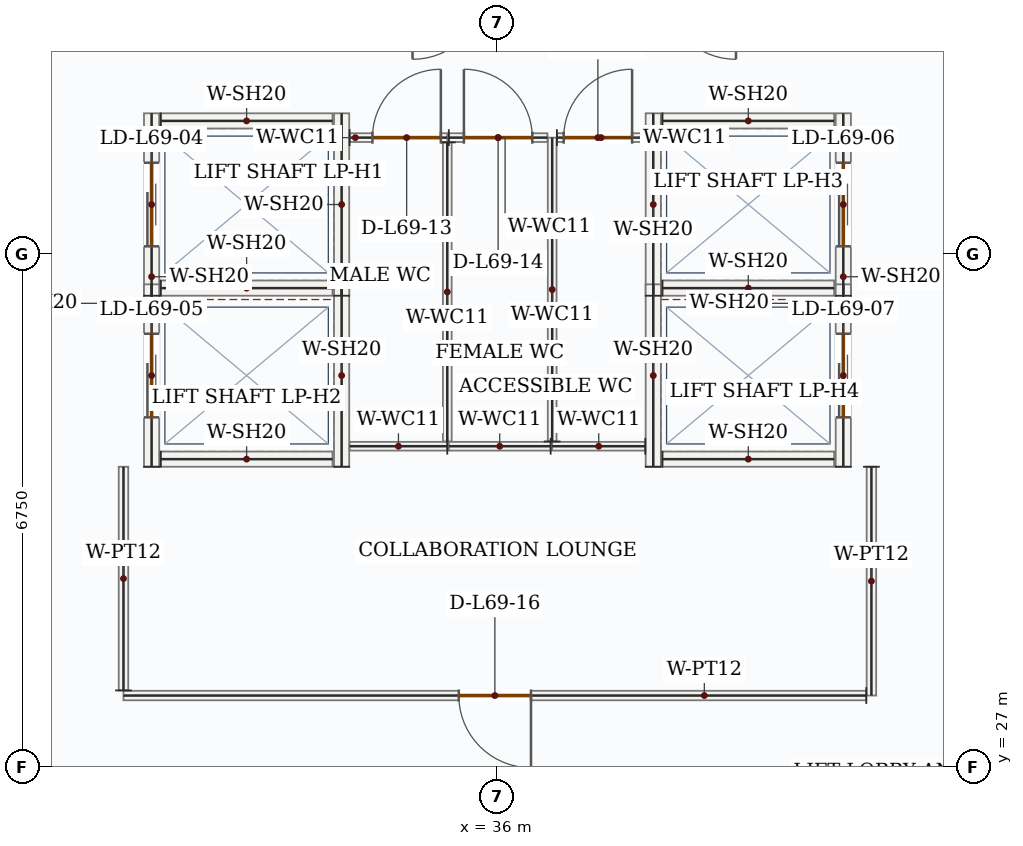
"""IFC4 building model, lengths in metres.
Left out: names, types, materials, properties, quantities, classifications, styles, units other than length and angle.
Written with IfcOpenShell. Run it as: python <this file> out.ifc"""

import sys

from ifc_helpers import new_model, si_unit, direction, frame, frame_2d, origin, place, context, subcontext, project, spatial, rectangle, extrude, source, transform, mapped, element, fill, save


model = new_model("IFC4")
c1 = context("Model", 3, precision=1e-05, world=origin(), true_north=direction((0.0, 1.0)))
c2 = subcontext(c1, "Body", "Model", "MODEL_VIEW")
j1 = project(units=[si_unit("LENGTHUNIT", "METRE"), si_unit("PLANEANGLEUNIT", "RADIAN")], contexts=[c1])
p1 = place(None, origin())
s1 = spatial("IfcSite", under=j1, at=p1, CompositionType="ELEMENT")
p2 = place(p1, origin())
s2 = spatial("IfcBuilding", under=s1, at=p2, CompositionType="ELEMENT")
p3 = place(p2, frame((0.0, 0.0, 287.85)))
s3 = spatial("IfcBuildingStorey", under=s2, at=p3, CompositionType="ELEMENT", Elevation=287.85)
p4 = place(p3, frame((31.45, 33.2, 0.0), z_axis=(0.0, 0.0, 1.0), x_axis=(0.0, 1.0, 0.0)))
e1 = element("IfcWall", 1, at=p4, inside=s3, PredefinedType="SOLIDWALL", context=c2, shape_type="SweptSolid", body=[
    extrude(rectangle(XDim=2.4, YDim=0.2, at=frame_2d((1.2, 0.0))), origin(), (0.0, 0.0, 1.0), 3.5),
])
p5 = place(p4, frame((0.65, 0.0, 0.0)))
e2 = element("IfcOpeningElement", 2, at=p5, cuts=e1, PredefinedType="OPENING", context=c2, shape_type="SweptSolid", body=[
    extrude(rectangle(XDim=1.1, YDim=2.15, at=frame_2d((0.55, 1.075))), frame((0.0, 0.11, 0.0), z_axis=(0.0, -1.0, 0.0), x_axis=(1.0, 0.0, 0.0)), (0.0, 0.0, 1.0), 0.22),
])
m1 = source(origin(), c2, "Body", "SweptSolid", [
    extrude(rectangle(XDim=2.4, YDim=0.2, at=frame_2d((1.2, 0.0))), origin(), (0.0, 0.0, 1.0), 3.5),
])
p6 = place(p3, frame((33.95, 33.2, 0.0), z_axis=(0.0, 0.0, 1.0), x_axis=(0.0, 1.0, 0.0)))
e3 = element("IfcWall", 3, at=p6, inside=s3, PredefinedType="SOLIDWALL", context=c2, shape_type="MappedRepresentation", body=[
    mapped(m1, transform((0.0, 0.0, 0.0), x_axis=(1.0, 0.0, 0.0), y_axis=(0.0, 1.0, 0.0), z_axis=(0.0, 0.0, 1.0), scale=1.0)),
])
m2 = source(origin(), c2, "Body", "SweptSolid", [
    extrude(rectangle(XDim=2.26, YDim=0.2, at=frame_2d((1.13, 0.0))), origin(), (0.0, 0.0, 1.0), 3.5),
])
for number, where, z_axis, x_axis in (
    (4, (31.57, 33.3, 0.0), (0.0, 0.0, 1.0), (1.0, 0.0, 0.0)),
    (5, (31.57, 35.5, 0.0), (0.0, 0.0, 1.0), (1.0, 0.0, 0.0)),
):
    element("IfcWall", number, at=place(p3, frame(where, z_axis=z_axis, x_axis=x_axis)), inside=s3, PredefinedType="SOLIDWALL", context=c2, shape_type="MappedRepresentation", body=[
        mapped(m2, transform((0.0, 0.0, 0.0), x_axis=(1.0, 0.0, 0.0), y_axis=(0.0, 1.0, 0.0), z_axis=(0.0, 0.0, 1.0), scale=1.0)),
    ])
p7 = place(p3, frame((31.45, 30.95, 0.0), z_axis=(0.0, 0.0, 1.0), x_axis=(0.0, 1.0, 0.0)))
e6 = element("IfcWall", 6, at=p7, inside=s3, PredefinedType="SOLIDWALL", context=c2, shape_type="SweptSolid", body=[
    extrude(rectangle(XDim=2.4, YDim=0.2, at=frame_2d((1.2, 0.0))), origin(), (0.0, 0.0, 1.0), 3.5),
])
p8 = place(p7, frame((0.65, 0.0, 0.0)))
e7 = element("IfcOpeningElement", 7, at=p8, cuts=e6, PredefinedType="OPENING", context=c2, shape_type="SweptSolid", body=[
    extrude(rectangle(XDim=1.1, YDim=2.15, at=frame_2d((0.55, 1.075))), frame((0.0, 0.11, 0.0), z_axis=(0.0, -1.0, 0.0), x_axis=(1.0, 0.0, 0.0)), (0.0, 0.0, 1.0), 0.22),
])
p9 = place(p3, frame((33.95, 30.95, 0.0), z_axis=(0.0, 0.0, 1.0), x_axis=(0.0, 1.0, 0.0)))
e8 = element("IfcWall", 8, at=p9, inside=s3, PredefinedType="SOLIDWALL", context=c2, shape_type="MappedRepresentation", body=[
    mapped(m1, transform((0.0, 0.0, 0.0), x_axis=(1.0, 0.0, 0.0), y_axis=(0.0, 1.0, 0.0), z_axis=(0.0, 0.0, 1.0), scale=1.0)),
])
p10 = place(p3, frame((31.57, 31.05, 0.0), z_axis=(0.0, 0.0, 1.0), x_axis=(1.0, 0.0, 0.0)))
e9 = element("IfcWall", 9, at=p10, inside=s3, PredefinedType="SOLIDWALL", context=c2, shape_type="MappedRepresentation", body=[
    mapped(m2, transform((0.0, 0.0, 0.0), x_axis=(1.0, 0.0, 0.0), y_axis=(0.0, 1.0, 0.0), z_axis=(0.0, 0.0, 1.0), scale=1.0)),
])
p11 = place(p3, frame((38.05, 33.2, 0.0), z_axis=(0.0, 0.0, 1.0), x_axis=(0.0, 1.0, 0.0)))
e10 = element("IfcWall", 10, at=p11, inside=s3, PredefinedType="SOLIDWALL", context=c2, shape_type="MappedRepresentation", body=[
    mapped(m1, transform((0.0, 0.0, 0.0), x_axis=(1.0, 0.0, 0.0), y_axis=(0.0, 1.0, 0.0), z_axis=(0.0, 0.0, 1.0), scale=1.0)),
])
p12 = place(p3, frame((40.55, 33.2, 0.0), z_axis=(0.0, 0.0, 1.0), x_axis=(0.0, 1.0, 0.0)))
e11 = element("IfcWall", 11, at=p12, inside=s3, PredefinedType="SOLIDWALL", context=c2, shape_type="SweptSolid", body=[
    extrude(rectangle(XDim=2.4, YDim=0.2, at=frame_2d((1.2, 0.0))), origin(), (0.0, 0.0, 1.0), 3.5),
])
p13 = place(p12, frame((0.65, 0.0, 0.0)))
e12 = element("IfcOpeningElement", 12, at=p13, cuts=e11, PredefinedType="OPENING", context=c2, shape_type="SweptSolid", body=[
    extrude(rectangle(XDim=1.1, YDim=2.15, at=frame_2d((0.55, 1.075))), frame((0.0, 0.11, 0.0), z_axis=(0.0, -1.0, 0.0), x_axis=(1.0, 0.0, 0.0)), (0.0, 0.0, 1.0), 0.22),
])
for number, where, z_axis, x_axis in (
    (13, (38.17, 33.3, 0.0), (0.0, 0.0, 1.0), (1.0, 0.0, 0.0)),
    (14, (38.17, 35.5, 0.0), (0.0, 0.0, 1.0), (1.0, 0.0, 0.0)),
):
    element("IfcWall", number, at=place(p3, frame(where, z_axis=z_axis, x_axis=x_axis)), inside=s3, PredefinedType="SOLIDWALL", context=c2, shape_type="MappedRepresentation", body=[
        mapped(m2, transform((0.0, 0.0, 0.0), x_axis=(1.0, 0.0, 0.0), y_axis=(0.0, 1.0, 0.0), z_axis=(0.0, 0.0, 1.0), scale=1.0)),
    ])
p14 = place(p3, frame((38.05, 30.95, 0.0), z_axis=(0.0, 0.0, 1.0), x_axis=(0.0, 1.0, 0.0)))
e15 = element("IfcWall", 15, at=p14, inside=s3, PredefinedType="SOLIDWALL", context=c2, shape_type="MappedRepresentation", body=[
    mapped(m1, transform((0.0, 0.0, 0.0), x_axis=(1.0, 0.0, 0.0), y_axis=(0.0, 1.0, 0.0), z_axis=(0.0, 0.0, 1.0), scale=1.0)),
])
p15 = place(p3, frame((40.55, 30.95, 0.0), z_axis=(0.0, 0.0, 1.0), x_axis=(0.0, 1.0, 0.0)))
e16 = element("IfcWall", 16, at=p15, inside=s3, PredefinedType="SOLIDWALL", context=c2, shape_type="SweptSolid", body=[
    extrude(rectangle(XDim=2.4, YDim=0.2, at=frame_2d((1.2, 0.0))), origin(), (0.0, 0.0, 1.0), 3.5),
])
p16 = place(p15, frame((0.65, 0.0, 0.0)))
e17 = element("IfcOpeningElement", 17, at=p16, cuts=e16, PredefinedType="OPENING", context=c2, shape_type="SweptSolid", body=[
    extrude(rectangle(XDim=1.1, YDim=2.15, at=frame_2d((0.55, 1.075))), frame((0.0, 0.11, 0.0), z_axis=(0.0, -1.0, 0.0), x_axis=(1.0, 0.0, 0.0)), (0.0, 0.0, 1.0), 0.22),
])
p17 = place(p3, frame((38.17, 31.05, 0.0), z_axis=(0.0, 0.0, 1.0), x_axis=(1.0, 0.0, 0.0)))
e18 = element("IfcWall", 18, at=p17, inside=s3, PredefinedType="SOLIDWALL", context=c2, shape_type="MappedRepresentation", body=[
    mapped(m2, transform((0.0, 0.0, 0.0), x_axis=(1.0, 0.0, 0.0), y_axis=(0.0, 1.0, 0.0), z_axis=(0.0, 0.0, 1.0), scale=1.0)),
])
m3 = source(origin(), c2, "Body", "SweptSolid", [
    extrude(rectangle(XDim=1.225, YDim=0.115, at=frame_2d((0.613, 0.0))), origin(), (0.0, 0.0, 1.0), 3.5),
])
p18 = place(p3, frame((37.945, 31.22, 0.0), z_axis=(0.0, 0.0, 1.0), x_axis=(-1.0, 0.0, 0.0)))
e19 = element("IfcWall", 19, at=p18, inside=s3, PredefinedType="PARTITIONING", context=c2, shape_type="MappedRepresentation", body=[
    mapped(m3, transform((0.0, 0.0, 0.0), x_axis=(1.0, 0.0, 0.0), y_axis=(0.0, 1.0, 0.0), z_axis=(0.0, 0.0, 1.0), scale=1.0)),
])
m4 = source(origin(), c2, "Body", "SweptSolid", [
    extrude(rectangle(XDim=3.998, YDim=0.115, at=frame_2d((1.999, 0.0))), origin(), (0.0, 0.0, 1.0), 3.5),
])
p19 = place(p3, frame((36.72, 31.282, 0.0), z_axis=(0.0, 0.0, 1.0), x_axis=(0.0, 1.0, 0.0)))
e20 = element("IfcWall", 20, at=p19, inside=s3, PredefinedType="PARTITIONING", context=c2, shape_type="MappedRepresentation", body=[
    mapped(m4, transform((0.0, 0.0, 0.0), x_axis=(1.0, 0.0, 0.0), y_axis=(0.0, 1.0, 0.0), z_axis=(0.0, 0.0, 1.0), scale=1.0)),
])
p20 = place(p3, frame((36.782, 35.28, 0.0), z_axis=(0.0, 0.0, 1.0), x_axis=(1.0, 0.0, 0.0)))
e21 = element("IfcWall", 21, at=p20, inside=s3, PredefinedType="PARTITIONING", context=c2, shape_type="SweptSolid", body=[
    extrude(rectangle(XDim=1.163, YDim=0.115, at=frame_2d((0.581, 0.0))), origin(), (0.0, 0.0, 1.0), 3.5),
])
p21 = place(p20, frame((0.089, 0.0, 0.0)))
e22 = element("IfcOpeningElement", 22, at=p21, cuts=e21, PredefinedType="OPENING", context=c2, shape_type="SweptSolid", body=[
    extrude(rectangle(XDim=0.9, YDim=2.1, at=frame_2d((0.45, 1.05))), frame((0.0, 0.067, 0.0), z_axis=(0.0, -1.0, 0.0), x_axis=(1.0, 0.0, 0.0)), (0.0, 0.0, 1.0), 0.135),
])
m5 = source(origin(), c2, "Body", "SweptSolid", [
    extrude(rectangle(XDim=1.285, YDim=0.115, at=frame_2d((0.643, 0.0))), origin(), (0.0, 0.0, 1.0), 3.5),
])
p22 = place(p3, frame((35.34, 31.22, 0.0), z_axis=(0.0, 0.0, 1.0), x_axis=(-1.0, 0.0, 0.0)))
e23 = element("IfcWall", 23, at=p22, inside=s3, PredefinedType="PARTITIONING", context=c2, shape_type="MappedRepresentation", body=[
    mapped(m5, transform((0.0, 0.0, 0.0), x_axis=(1.0, 0.0, 0.0), y_axis=(0.0, 1.0, 0.0), z_axis=(0.0, 0.0, 1.0), scale=1.0)),
])
p23 = place(p3, frame((34.055, 35.28, 0.0), z_axis=(0.0, 0.0, 1.0), x_axis=(1.0, 0.0, 0.0)))
e24 = element("IfcWall", 24, at=p23, inside=s3, PredefinedType="PARTITIONING", context=c2, shape_type="SweptSolid", body=[
    extrude(rectangle(XDim=1.285, YDim=0.115, at=frame_2d((0.643, 0.0))), origin(), (0.0, 0.0, 1.0), 3.5),
])
p24 = place(p23, frame((0.3, 0.0, 0.0)))
e25 = element("IfcOpeningElement", 25, at=p24, cuts=e24, PredefinedType="OPENING", context=c2, shape_type="SweptSolid", body=[
    extrude(rectangle(XDim=0.9, YDim=2.1, at=frame_2d((0.45, 1.05))), frame((0.0, 0.067, 0.0), z_axis=(0.0, -1.0, 0.0), x_axis=(1.0, 0.0, 0.0)), (0.0, 0.0, 1.0), 0.135),
])
m6 = source(origin(), c2, "Body", "SweptSolid", [
    extrude(rectangle(XDim=3.935, YDim=0.115, at=frame_2d((1.968, 0.0))), origin(), (0.0, 0.0, 1.0), 3.5),
])
p25 = place(p3, frame((35.34, 35.218, 0.0), z_axis=(0.0, 0.0, 1.0), x_axis=(0.0, -1.0, 0.0)))
e26 = element("IfcWall", 26, at=p25, inside=s3, PredefinedType="PARTITIONING", context=c2, shape_type="MappedRepresentation", body=[
    mapped(m6, transform((0.0, 0.0, 0.0), x_axis=(1.0, 0.0, 0.0), y_axis=(0.0, 1.0, 0.0), z_axis=(0.0, 0.0, 1.0), scale=1.0)),
])
m7 = source(origin(), c2, "Body", "SweptSolid", [
    extrude(rectangle(XDim=1.34, YDim=0.115, at=frame_2d((0.67, 0.0))), origin(), (0.0, 0.0, 1.0), 3.5),
])
p26 = place(p3, frame((36.7, 31.22, 0.0), z_axis=(0.0, 0.0, 1.0), x_axis=(-1.0, 0.0, 0.0)))
e27 = element("IfcWall", 27, at=p26, inside=s3, PredefinedType="PARTITIONING", context=c2, shape_type="MappedRepresentation", body=[
    mapped(m7, transform((0.0, 0.0, 0.0), x_axis=(1.0, 0.0, 0.0), y_axis=(0.0, 1.0, 0.0), z_axis=(0.0, 0.0, 1.0), scale=1.0)),
])
p27 = place(p3, frame((35.36, 35.28, 0.0), z_axis=(0.0, 0.0, 1.0), x_axis=(1.0, 0.0, 0.0)))
e28 = element("IfcWall", 28, at=p27, inside=s3, PredefinedType="PARTITIONING", context=c2, shape_type="SweptSolid", body=[
    extrude(rectangle(XDim=1.297, YDim=0.115, at=frame_2d((0.649, 0.0))), origin(), (0.0, 0.0, 1.0), 3.5),
])
p28 = place(p27, frame((0.199, 0.0, 0.0)))
e29 = element("IfcOpeningElement", 29, at=p28, cuts=e28, PredefinedType="OPENING", context=c2, shape_type="SweptSolid", body=[
    extrude(rectangle(XDim=0.9, YDim=2.1, at=frame_2d((0.45, 1.05))), frame((0.0, 0.067, 0.0), z_axis=(0.0, -1.0, 0.0), x_axis=(1.0, 0.0, 0.0)), (0.0, 0.0, 1.0), 0.135),
])
m8 = source(origin(), c2, "Body", "SweptSolid", [
    extrude(rectangle(XDim=3.01, YDim=0.125, at=frame_2d((1.505, 0.0))), origin(), (0.0, 0.0, 1.0), 3.5),
])
p29 = place(p3, frame((40.92, 30.95, 0.0), z_axis=(0.0, 0.0, 1.0), x_axis=(0.0, -1.0, 0.0)))
e30 = element("IfcWall", 30, at=p29, inside=s3, PredefinedType="PARTITIONING", context=c2, shape_type="MappedRepresentation", body=[
    mapped(m8, transform((0.0, 0.0, 0.0), x_axis=(1.0, 0.0, 0.0), y_axis=(0.0, 1.0, 0.0), z_axis=(0.0, 0.0, 1.0), scale=1.0)),
])
p30 = place(p3, frame((40.853, 27.94, 0.0), z_axis=(0.0, 0.0, 1.0), x_axis=(-1.0, 0.0, 0.0)))
e31 = element("IfcWall", 31, at=p30, inside=s3, PredefinedType="PARTITIONING", context=c2, shape_type="SweptSolid", body=[
    extrude(rectangle(XDim=9.772, YDim=0.125, at=frame_2d((4.886, 0.0))), origin(), (0.0, 0.0, 1.0), 3.5),
])
p31 = place(p30, frame((4.411, 0.0, 0.0)))
e32 = element("IfcOpeningElement", 32, at=p31, cuts=e31, PredefinedType="OPENING", context=c2, shape_type="SweptSolid", body=[
    extrude(rectangle(XDim=0.95, YDim=2.15, at=frame_2d((0.475, 1.075))), frame((0.0, 0.073, 0.0), z_axis=(0.0, -1.0, 0.0), x_axis=(1.0, 0.0, 0.0)), (0.0, 0.0, 1.0), 0.145),
])
m9 = source(origin(), c2, "Body", "SweptSolid", [
    extrude(rectangle(XDim=2.942, YDim=0.125, at=frame_2d((1.471, 0.0))), origin(), (0.0, 0.0, 1.0), 3.5),
])
p32 = place(p3, frame((31.08, 28.008, 0.0), z_axis=(0.0, 0.0, 1.0), x_axis=(0.0, 1.0, 0.0)))
e33 = element("IfcWall", 33, at=p32, inside=s3, PredefinedType="PARTITIONING", context=c2, shape_type="MappedRepresentation", body=[
    mapped(m9, transform((0.0, 0.0, 0.0), x_axis=(1.0, 0.0, 0.0), y_axis=(0.0, 1.0, 0.0), z_axis=(0.0, 0.0, 1.0), scale=1.0)),
])
m10 = source(origin(), c2, "Body", "SweptSolid", [
    extrude(rectangle(XDim=1.1, YDim=2.15, at=frame_2d((0.55, 1.075))), frame((0.0, 0.025, 0.0), z_axis=(0.0, -1.0, 0.0), x_axis=(1.0, 0.0, 0.0)), (0.0, 0.0, 1.0), 0.05),
])
p33 = place(p5, origin())
e34 = element("IfcDoor", 34, at=p33, inside=s3, OperationType="DOUBLE_DOOR_SLIDING", PredefinedType="DOOR", context=c2, shape_type="MappedRepresentation", body=[
    mapped(m10, transform((0.0, 0.0, 0.0), x_axis=(1.0, 0.0, 0.0), y_axis=(0.0, 1.0, 0.0), z_axis=(0.0, 0.0, 1.0), scale=1.0)),
])
fill(e2, e34)
p34 = place(p8, origin())
e35 = element("IfcDoor", 35, at=p34, inside=s3, OperationType="DOUBLE_DOOR_SLIDING", PredefinedType="DOOR", context=c2, shape_type="MappedRepresentation", body=[
    mapped(m10, transform((0.0, 0.0, 0.0), x_axis=(1.0, 0.0, 0.0), y_axis=(0.0, 1.0, 0.0), z_axis=(0.0, 0.0, 1.0), scale=1.0)),
])
fill(e7, e35)
p35 = place(p13, origin())
e36 = element("IfcDoor", 36, at=p35, inside=s3, OperationType="DOUBLE_DOOR_SLIDING", PredefinedType="DOOR", context=c2, shape_type="MappedRepresentation", body=[
    mapped(m10, transform((0.0, 0.0, 0.0), x_axis=(1.0, 0.0, 0.0), y_axis=(0.0, 1.0, 0.0), z_axis=(0.0, 0.0, 1.0), scale=1.0)),
])
fill(e12, e36)
p36 = place(p16, origin())
e37 = element("IfcDoor", 37, at=p36, inside=s3, OperationType="DOUBLE_DOOR_SLIDING", PredefinedType="DOOR", context=c2, shape_type="MappedRepresentation", body=[
    mapped(m10, transform((0.0, 0.0, 0.0), x_axis=(1.0, 0.0, 0.0), y_axis=(0.0, 1.0, 0.0), z_axis=(0.0, 0.0, 1.0), scale=1.0)),
])
fill(e17, e37)
m11 = source(origin(), c2, "Body", "SweptSolid", [
    extrude(rectangle(XDim=0.9, YDim=2.1, at=frame_2d((0.45, 1.05))), frame((0.0, 0.025, 0.0), z_axis=(0.0, -1.0, 0.0), x_axis=(1.0, 0.0, 0.0)), (0.0, 0.0, 1.0), 0.05),
])
p37 = place(p24, origin())
e38 = element("IfcDoor", 38, at=p37, inside=s3, OperationType="SINGLE_SWING_RIGHT", PredefinedType="DOOR", context=c2, shape_type="MappedRepresentation", body=[
    mapped(m11, transform((0.0, 0.0, 0.0), x_axis=(1.0, 0.0, 0.0), y_axis=(0.0, 1.0, 0.0), z_axis=(0.0, 0.0, 1.0), scale=1.0)),
])
fill(e25, e38)
p38 = place(p28, origin())
e39 = element("IfcDoor", 39, at=p38, inside=s3, OperationType="SINGLE_SWING_LEFT", PredefinedType="DOOR", context=c2, shape_type="MappedRepresentation", body=[
    mapped(m11, transform((0.0, 0.0, 0.0), x_axis=(1.0, 0.0, 0.0), y_axis=(0.0, 1.0, 0.0), z_axis=(0.0, 0.0, 1.0), scale=1.0)),
])
fill(e29, e39)
p39 = place(p21, origin())
e40 = element("IfcDoor", 40, at=p39, inside=s3, OperationType="SINGLE_SWING_RIGHT", PredefinedType="DOOR", context=c2, shape_type="MappedRepresentation", body=[
    mapped(m11, transform((0.0, 0.0, 0.0), x_axis=(1.0, 0.0, 0.0), y_axis=(0.0, 1.0, 0.0), z_axis=(0.0, 0.0, 1.0), scale=1.0)),
])
fill(e22, e40)
m12 = source(origin(), c2, "Body", "SweptSolid", [
    extrude(rectangle(XDim=0.95, YDim=2.15, at=frame_2d((0.475, 1.075))), frame((0.0, 0.025, 0.0), z_axis=(0.0, -1.0, 0.0), x_axis=(1.0, 0.0, 0.0)), (0.0, 0.0, 1.0), 0.05),
])
p40 = place(p31, origin())
e41 = element("IfcDoor", 41, at=p40, inside=s3, OperationType="SINGLE_SWING_LEFT", PredefinedType="DOOR", context=c2, shape_type="MappedRepresentation", body=[
    mapped(m12, transform((0.0, 0.0, 0.0), x_axis=(1.0, 0.0, 0.0), y_axis=(0.0, 1.0, 0.0), z_axis=(0.0, 0.0, 1.0), scale=1.0)),
])
fill(e32, e41)
save(model, sys.argv[1])
